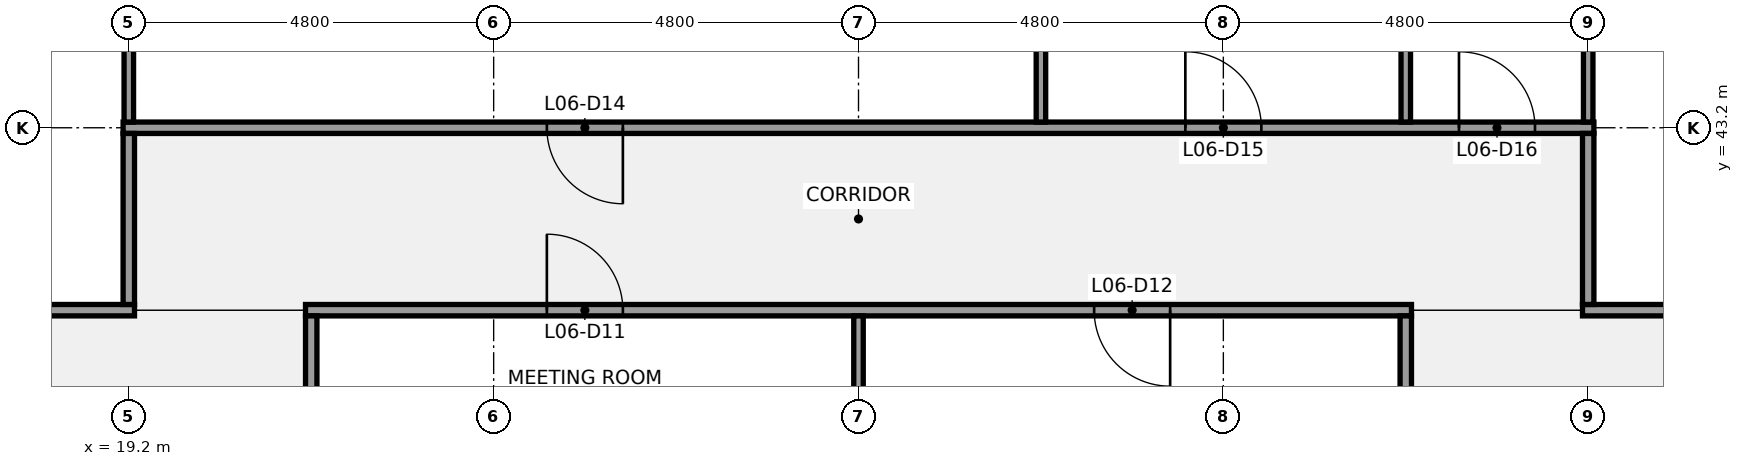
"""IFC4 building model, lengths in metres.
Left out: names, types, materials, properties, quantities, classifications, styles, units other than length and angle.
Written with IfcOpenShell. Run it as: python <this file> out.ifc"""

import sys

from ifc_helpers import new_model, si_unit, direction, frame, frame_2d, origin, place, context, subcontext, project, spatial, rectangle, extrude, element, fill, save


model = new_model("IFC4")
c1 = context("Model", 3, precision=1e-05, world=origin(), true_north=direction((0.0, 1.0)))
c2 = subcontext(c1, "Body", "Model", "MODEL_VIEW")
j1 = project(units=[si_unit("LENGTHUNIT", "METRE"), si_unit("PLANEANGLEUNIT", "RADIAN")], contexts=[c1])
p1 = place(None, origin())
s1 = spatial("IfcSite", under=j1, at=p1, CompositionType="ELEMENT")
p2 = place(p1, origin())
s2 = spatial("IfcBuilding", under=s1, at=p2, CompositionType="ELEMENT")
p3 = place(p2, frame((0.0, 0.0, 34.6)))
s3 = spatial("IfcBuildingStorey", under=s2, at=p3, CompositionType="ELEMENT", Elevation=34.6)
p4 = place(p3, frame((14.325, 40.8, 0.0), z_axis=(0.0, 0.0, 1.0), x_axis=(1.0, 0.0, 0.0)))
e1 = element("IfcWall", 1, at=p4, inside=s3, PredefinedType="PARTITIONING", context=c2, shape_type="SweptSolid", body=[
    extrude(rectangle(XDim=4.95, YDim=0.15, at=frame_2d((2.475, 0.0))), origin(), (0.0, 0.0, 1.0), 3.27),
])
p5 = place(p4, frame((1.975, 0.0, 0.0)))
e2 = element("IfcOpeningElement", 2, at=p5, cuts=e1, PredefinedType="OPENING", context=c2, shape_type="SweptSolid", body=[
    extrude(rectangle(XDim=1.0, YDim=2.1, at=frame_2d((0.5, 1.05))), frame((0.0, 0.085, 0.0), z_axis=(0.0, -1.0, 0.0), x_axis=(1.0, 0.0, 0.0)), (0.0, 0.0, 1.0), 0.17),
])
p6 = place(p3, frame((21.525, 40.8, 0.0), z_axis=(0.0, 0.0, 1.0), x_axis=(1.0, 0.0, 0.0)))
e3 = element("IfcWall", 3, at=p6, inside=s3, PredefinedType="PARTITIONING", context=c2, shape_type="SweptSolid", body=[
    extrude(rectangle(XDim=14.55, YDim=0.15, at=frame_2d((7.275, 0.0))), origin(), (0.0, 0.0, 1.0), 3.27),
])
p7 = place(p6, frame((3.175, 0.0, 0.0)))
e4 = element("IfcOpeningElement", 4, at=p7, cuts=e3, PredefinedType="OPENING", context=c2, shape_type="SweptSolid", body=[
    extrude(rectangle(XDim=1.0, YDim=2.1, at=frame_2d((0.5, 1.05))), frame((0.0, 0.085, 0.0), z_axis=(0.0, -1.0, 0.0), x_axis=(1.0, 0.0, 0.0)), (0.0, 0.0, 1.0), 0.17),
])
p8 = place(p6, frame((10.375, 0.0, 0.0)))
e5 = element("IfcOpeningElement", 5, at=p8, cuts=e3, PredefinedType="OPENING", context=c2, shape_type="SweptSolid", body=[
    extrude(rectangle(XDim=1.0, YDim=2.1, at=frame_2d((0.5, 1.05))), frame((0.0, 0.085, 0.0), z_axis=(0.0, -1.0, 0.0), x_axis=(1.0, 0.0, 0.0)), (0.0, 0.0, 1.0), 0.17),
])
p9 = place(p3, frame((38.325, 40.8, 0.0), z_axis=(0.0, 0.0, 1.0), x_axis=(1.0, 0.0, 0.0)))
e6 = element("IfcWall", 6, at=p9, inside=s3, PredefinedType="PARTITIONING", context=c2, shape_type="SweptSolid", body=[
    extrude(rectangle(XDim=4.95, YDim=0.15, at=frame_2d((2.475, 0.0))), origin(), (0.0, 0.0, 1.0), 3.27),
])
p10 = place(p9, frame((1.975, 0.0, 0.0)))
e7 = element("IfcOpeningElement", 7, at=p10, cuts=e6, PredefinedType="OPENING", context=c2, shape_type="SweptSolid", body=[
    extrude(rectangle(XDim=1.0, YDim=2.1, at=frame_2d((0.5, 1.05))), frame((0.0, 0.085, 0.0), z_axis=(0.0, -1.0, 0.0), x_axis=(1.0, 0.0, 0.0)), (0.0, 0.0, 1.0), 0.17),
])
p11 = place(p3, frame((19.125, 43.2, 0.0), z_axis=(0.0, 0.0, 1.0), x_axis=(1.0, 0.0, 0.0)))
e8 = element("IfcWall", 8, at=p11, inside=s3, PredefinedType="PARTITIONING", context=c2, shape_type="SweptSolid", body=[
    extrude(rectangle(XDim=19.35, YDim=0.15, at=frame_2d((9.675, 0.0))), origin(), (0.0, 0.0, 1.0), 3.27),
])
p12 = place(p11, frame((5.575, 0.0, 0.0)))
e9 = element("IfcOpeningElement", 9, at=p12, cuts=e8, PredefinedType="OPENING", context=c2, shape_type="SweptSolid", body=[
    extrude(rectangle(XDim=1.0, YDim=2.1, at=frame_2d((0.5, 1.05))), frame((0.0, 0.085, 0.0), z_axis=(0.0, -1.0, 0.0), x_axis=(1.0, 0.0, 0.0)), (0.0, 0.0, 1.0), 0.17),
])
p13 = place(p11, frame((13.975, 0.0, 0.0)))
e10 = element("IfcOpeningElement", 10, at=p13, cuts=e8, PredefinedType="OPENING", context=c2, shape_type="SweptSolid", body=[
    extrude(rectangle(XDim=1.0, YDim=2.1, at=frame_2d((0.5, 1.05))), frame((0.0, 0.085, 0.0), z_axis=(0.0, -1.0, 0.0), x_axis=(1.0, 0.0, 0.0)), (0.0, 0.0, 1.0), 0.17),
])
p14 = place(p11, frame((17.575, 0.0, 0.0)))
e11 = element("IfcOpeningElement", 11, at=p14, cuts=e8, PredefinedType="OPENING", context=c2, shape_type="SweptSolid", body=[
    extrude(rectangle(XDim=1.0, YDim=2.1, at=frame_2d((0.5, 1.05))), frame((0.0, 0.085, 0.0), z_axis=(0.0, -1.0, 0.0), x_axis=(1.0, 0.0, 0.0)), (0.0, 0.0, 1.0), 0.17),
])
p15 = place(p3, frame((19.2, 43.275, 0.0), z_axis=(0.0, 0.0, 1.0), x_axis=(0.0, 1.0, 0.0)))
e12 = element("IfcWall", 12, at=p15, inside=s3, PredefinedType="PARTITIONING", context=c2, shape_type="SweptSolid", body=[
    extrude(rectangle(XDim=4.075, YDim=0.125, at=frame_2d((2.038, 0.0))), origin(), (0.0, 0.0, 1.0), 3.27),
])
p16 = place(p3, frame((19.2, 40.875, 0.0), z_axis=(0.0, 0.0, 1.0), x_axis=(0.0, 1.0, 0.0)))
e13 = element("IfcWall", 13, at=p16, inside=s3, PredefinedType="PARTITIONING", context=c2, shape_type="SweptSolid", body=[
    extrude(rectangle(XDim=2.25, YDim=0.15, at=frame_2d((1.125, 0.0))), origin(), (0.0, 0.0, 1.0), 3.27),
])
p17 = place(p3, frame((21.6, 38.462, 0.0), z_axis=(0.0, 0.0, 1.0), x_axis=(0.0, 1.0, 0.0)))
e14 = element("IfcWall", 14, at=p17, inside=s3, PredefinedType="PARTITIONING", context=c2, shape_type="SweptSolid", body=[
    extrude(rectangle(XDim=2.263, YDim=0.15, at=frame_2d((1.131, 0.0))), origin(), (0.0, 0.0, 1.0), 3.27),
])
p18 = place(p3, frame((28.8, 38.462, 0.0), z_axis=(0.0, 0.0, 1.0), x_axis=(0.0, 1.0, 0.0)))
e15 = element("IfcWall", 15, at=p18, inside=s3, PredefinedType="PARTITIONING", context=c2, shape_type="SweptSolid", body=[
    extrude(rectangle(XDim=2.263, YDim=0.125, at=frame_2d((1.131, 0.0))), origin(), (0.0, 0.0, 1.0), 3.27),
])
for number, where, z_axis, x_axis in (
    (16, (31.2, 43.275, 0.0), (0.0, 0.0, 1.0), (0.0, 1.0, 0.0)),
    (17, (36.0, 43.275, 0.0), (0.0, 0.0, 1.0), (0.0, 1.0, 0.0)),
):
    element("IfcWall", number, at=place(p3, frame(where, z_axis=z_axis, x_axis=x_axis)), inside=s3, PredefinedType="PARTITIONING", context=c2, shape_type="SweptSolid", body=[
        extrude(rectangle(XDim=4.625, YDim=0.125, at=frame_2d((2.312, 0.0))), origin(), (0.0, 0.0, 1.0), 3.27),
    ])
p19 = place(p3, frame((36.0, 38.462, 0.0), z_axis=(0.0, 0.0, 1.0), x_axis=(0.0, 1.0, 0.0)))
e18 = element("IfcWall", 18, at=p19, inside=s3, PredefinedType="PARTITIONING", context=c2, shape_type="SweptSolid", body=[
    extrude(rectangle(XDim=2.263, YDim=0.15, at=frame_2d((1.131, 0.0))), origin(), (0.0, 0.0, 1.0), 3.27),
])
p20 = place(p3, frame((38.4, 43.275, 0.0), z_axis=(0.0, 0.0, 1.0), x_axis=(0.0, 1.0, 0.0)))
e19 = element("IfcWall", 19, at=p20, inside=s3, PredefinedType="PARTITIONING", context=c2, shape_type="SweptSolid", body=[
    extrude(rectangle(XDim=4.075, YDim=0.125, at=frame_2d((2.038, 0.0))), origin(), (0.0, 0.0, 1.0), 3.27),
])
p21 = place(p3, frame((38.4, 40.875, 0.0), z_axis=(0.0, 0.0, 1.0), x_axis=(0.0, 1.0, 0.0)))
e20 = element("IfcWall", 20, at=p21, inside=s3, PredefinedType="PARTITIONING", context=c2, shape_type="SweptSolid", body=[
    extrude(rectangle(XDim=2.25, YDim=0.15, at=frame_2d((1.125, 0.0))), origin(), (0.0, 0.0, 1.0), 3.27),
])
p22 = place(p7, origin())
e21 = element("IfcDoor", 21, at=p22, inside=s3, OperationType="SINGLE_SWING_LEFT", PredefinedType="DOOR", context=c2, shape_type="SweptSolid", body=[
    extrude(rectangle(XDim=1.0, YDim=2.1, at=frame_2d((0.5, 1.05))), frame((0.0, 0.025, 0.0), z_axis=(0.0, -1.0, 0.0), x_axis=(1.0, 0.0, 0.0)), (0.0, 0.0, 1.0), 0.05),
])
fill(e4, e21)
p23 = place(p8, origin())
e22 = element("IfcDoor", 22, at=p23, inside=s3, OperationType="SINGLE_SWING_RIGHT", PredefinedType="DOOR", context=c2, shape_type="SweptSolid", body=[
    extrude(rectangle(XDim=1.0, YDim=2.1, at=frame_2d((0.5, 1.05))), frame((0.0, 0.025, 0.0), z_axis=(0.0, -1.0, 0.0), x_axis=(1.0, 0.0, 0.0)), (0.0, 0.0, 1.0), 0.05),
])
fill(e5, e22)
p24 = place(p12, origin())
e23 = element("IfcDoor", 23, at=p24, inside=s3, OperationType="SINGLE_SWING_RIGHT", PredefinedType="DOOR", context=c2, shape_type="SweptSolid", body=[
    extrude(rectangle(XDim=1.0, YDim=2.1, at=frame_2d((0.5, 1.05))), frame((0.0, 0.025, 0.0), z_axis=(0.0, -1.0, 0.0), x_axis=(1.0, 0.0, 0.0)), (0.0, 0.0, 1.0), 0.05),
])
fill(e9, e23)
p25 = place(p13, origin())
e24 = element("IfcDoor", 24, at=p25, inside=s3, OperationType="SINGLE_SWING_LEFT", PredefinedType="DOOR", context=c2, shape_type="SweptSolid", body=[
    extrude(rectangle(XDim=1.0, YDim=2.1, at=frame_2d((0.5, 1.05))), frame((0.0, 0.025, 0.0), z_axis=(0.0, -1.0, 0.0), x_axis=(1.0, 0.0, 0.0)), (0.0, 0.0, 1.0), 0.05),
])
fill(e10, e24)
p26 = place(p14, origin())
e25 = element("IfcDoor", 25, at=p26, inside=s3, OperationType="SINGLE_SWING_LEFT", PredefinedType="DOOR", context=c2, shape_type="SweptSolid", body=[
    extrude(rectangle(XDim=1.0, YDim=2.1, at=frame_2d((0.5, 1.05))), frame((0.0, 0.025, 0.0), z_axis=(0.0, -1.0, 0.0), x_axis=(1.0, 0.0, 0.0)), (0.0, 0.0, 1.0), 0.05),
])
fill(e11, e25)
save(model, sys.argv[1])
